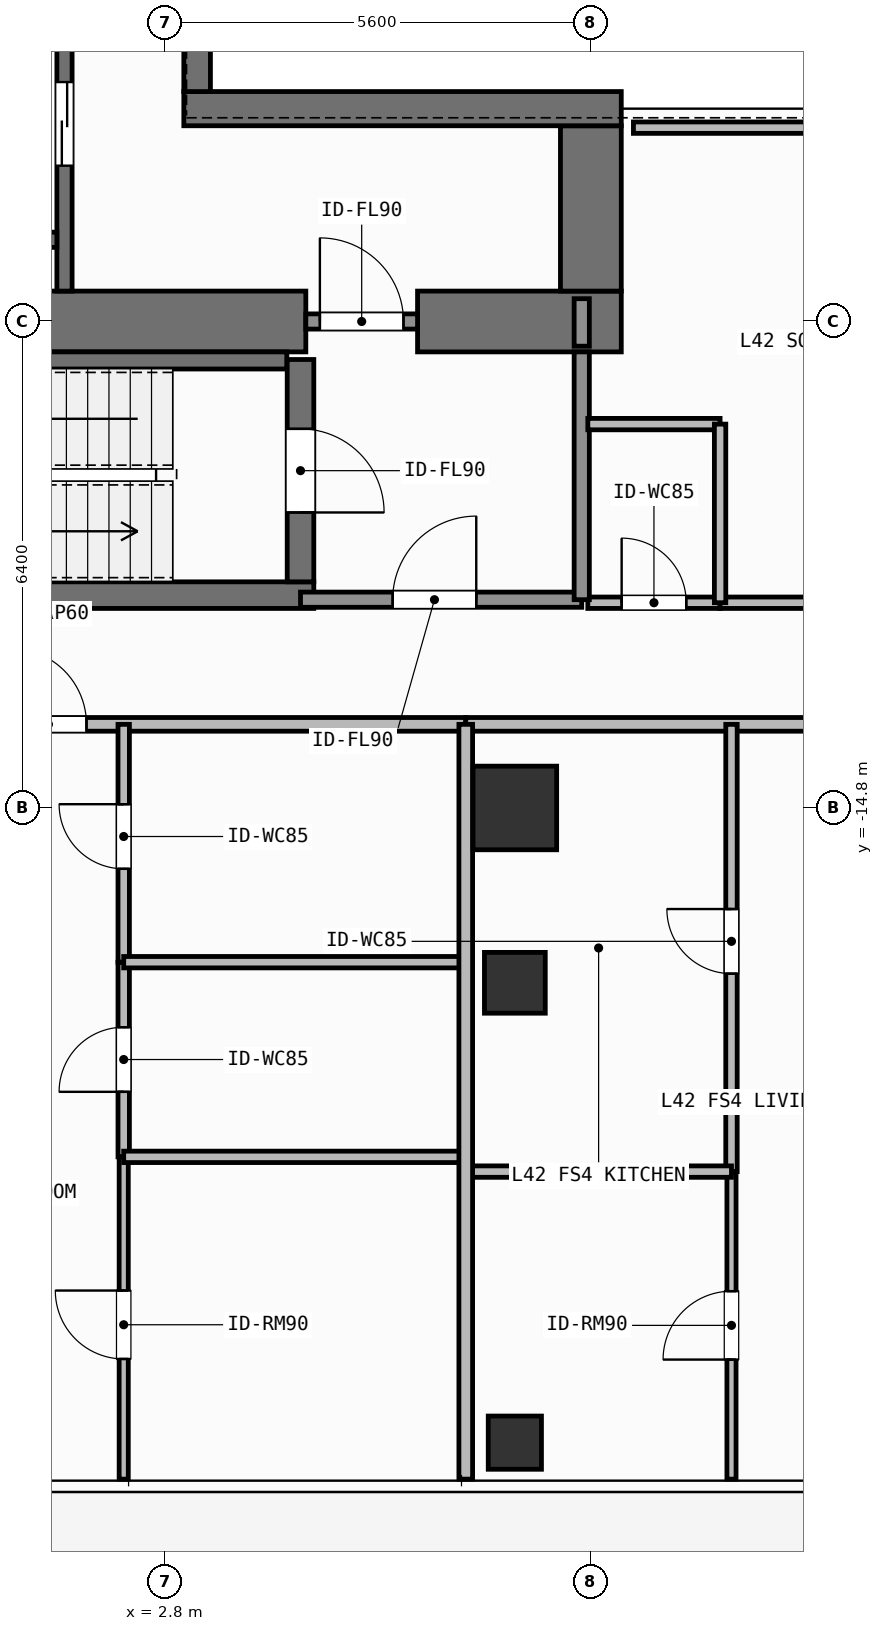
"""IFC4 building model, lengths in metres.
Left out: names, types, materials, properties, quantities, classifications, styles, units other than length and angle.
Written with IfcOpenShell. Run it as: python <this file> out.ifc"""

import sys

from ifc_helpers import new_model, si_unit, direction, frame, frame_2d, origin, origin_2d, place, context, subcontext, project, spatial, rectangle, hollow_rectangle, extrude, element, fill, save


model = new_model("IFC4")
c1 = context("Model", 3, precision=1e-05, world=origin(), true_north=direction((0.0, 1.0)))
c2 = subcontext(c1, "Body", "Model", "MODEL_VIEW")
j1 = project(units=[si_unit("LENGTHUNIT", "METRE"), si_unit("PLANEANGLEUNIT", "RADIAN")], contexts=[c1])
p1 = place(None, origin())
s1 = spatial("IfcSite", under=j1, at=p1, CompositionType="ELEMENT")
p2 = place(p1, origin())
s2 = spatial("IfcBuilding", under=s1, at=p2, CompositionType="ELEMENT")
p3 = place(p2, frame((0.0, 0.0, 171.9)))
s3 = spatial("IfcBuildingStorey", under=s2, at=p3, CompositionType="ELEMENT", Elevation=171.9)
p4 = place(p3, frame((-2.62, -8.4, 0.0), z_axis=(0.0, 0.0, 1.0), x_axis=(1.0, 0.0, 0.0)))
e1 = element("IfcWall", 1, at=p4, inside=s3, PredefinedType="SHEAR", context=c2, shape_type="SweptSolid", body=[
    extrude(rectangle(XDim=7.27, YDim=0.8, at=frame_2d((3.635, 0.0))), origin(), (0.0, 0.0, 1.0), 3.9),
])
p5 = place(p3, frame((6.12, -8.4, 0.0), z_axis=(0.0, 0.0, 1.0), x_axis=(1.0, 0.0, 0.0)))
e2 = element("IfcWall", 2, at=p5, inside=s3, PredefinedType="SHEAR", context=c2, shape_type="SweptSolid", body=[
    extrude(rectangle(XDim=2.68, YDim=0.8, at=frame_2d((1.34, 0.0))), origin(), (0.0, 0.0, 1.0), 3.9),
])
p6 = place(p3, frame((8.4, -8.0, 0.0), z_axis=(0.0, 0.0, 1.0), x_axis=(0.0, 1.0, 0.0)))
e3 = element("IfcWall", 3, at=p6, inside=s3, PredefinedType="SHEAR", context=c2, shape_type="SweptSolid", body=[
    extrude(rectangle(XDim=2.175, YDim=0.8, at=frame_2d((1.087, 0.0))), origin(), (0.0, 0.0, 1.0), 3.9),
])
p7 = place(p3, frame((3.045, -5.6, 0.0), z_axis=(0.0, 0.0, 1.0), x_axis=(1.0, 0.0, 0.0)))
e4 = element("IfcWall", 4, at=p7, inside=s3, PredefinedType="SHEAR", context=c2, shape_type="SweptSolid", body=[
    extrude(rectangle(XDim=5.755, YDim=0.45, at=frame_2d((2.877, 0.0))), origin(), (0.0, 0.0, 1.0), 3.9),
])
p8 = place(p3, frame((3.22, -5.375, 0.0), z_axis=(0.0, 0.0, 1.0), x_axis=(0.0, 1.0, 0.0)))
e5 = element("IfcWall", 5, at=p8, inside=s3, PredefinedType="SHEAR", context=c2, shape_type="SweptSolid", body=[
    extrude(rectangle(XDim=10.75, YDim=0.35, at=frame_2d((5.375, 0.0))), origin(), (0.0, 0.0, 1.0), 3.9),
])
p9 = place(p3, frame((-2.555, -12.0, 0.0), z_axis=(0.0, 0.0, 1.0), x_axis=(1.0, 0.0, 0.0)))
e6 = element("IfcWall", 6, at=p9, inside=s3, PredefinedType="SHEAR", context=c2, shape_type="SweptSolid", body=[
    extrude(rectangle(XDim=7.31, YDim=0.35, at=frame_2d((3.655, 0.0))), origin(), (0.0, 0.0, 1.0), 3.9),
])
p10 = place(p3, frame((-2.2, -8.913, 0.0), z_axis=(0.0, 0.0, 1.0), x_axis=(1.0, 0.0, 0.0)))
e7 = element("IfcWall", 7, at=p10, inside=s3, PredefinedType="SHEAR", context=c2, shape_type="SweptSolid", body=[
    extrude(rectangle(XDim=6.6, YDim=0.225, at=frame_2d((3.3, 0.0))), origin(), (0.0, 0.0, 1.0), 3.9),
])
p11 = place(p3, frame((4.58, -8.9, 0.0), z_axis=(0.0, 0.0, 1.0), x_axis=(0.0, -1.0, 0.0)))
e8 = element("IfcWall", 8, at=p11, inside=s3, PredefinedType="SHEAR", context=c2, shape_type="SweptSolid", body=[
    extrude(rectangle(XDim=2.925, YDim=0.35, at=frame_2d((1.462, 0.0))), origin(), (0.0, 0.0, 1.0), 3.9),
])
p12 = place(p11, frame((0.913, 0.0, 0.0)))
e9 = element("IfcOpeningElement", 9, at=p12, cuts=e8, PredefinedType="OPENING", context=c2, shape_type="SweptSolid", body=[
    extrude(rectangle(XDim=1.1, YDim=2.15, at=frame_2d((0.55, 1.075))), frame((0.0, 0.185, 0.0), z_axis=(0.0, -1.0, 0.0), x_axis=(1.0, 0.0, 0.0)), (0.0, 0.0, 1.0), 0.37),
])
p13 = place(p3, frame((7.4, -14.8, 0.0), z_axis=(0.0, 0.0, 1.0), x_axis=(1.0, 0.0, 0.0)))
e10 = element("IfcColumn", 10, at=p13, inside=s3, PredefinedType="COLUMN", context=c2, shape_type="SweptSolid", body=[
    extrude(rectangle(XDim=1.1, YDim=1.1, at=origin_2d()), origin(), (0.0, 0.0, 1.0), 3.9),
])
p14 = place(p3, frame((7.4, -17.1, 0.0), z_axis=(0.0, 0.0, 1.0), x_axis=(1.0, 0.0, 0.0)))
e11 = element("IfcColumn", 11, at=p14, inside=s3, PredefinedType="COLUMN", context=c2, shape_type="SweptSolid", body=[
    extrude(hollow_rectangle(XDim=0.8, YDim=0.8, WallThickness=0.036, at=origin_2d()), origin(), (0.0, 0.0, 1.0), 3.9),
])
p15 = place(p3, frame((7.4, -23.15, 0.0), z_axis=(0.0, 0.0, 1.0), x_axis=(1.0, 0.0, 0.0)))
e12 = element("IfcColumn", 12, at=p15, inside=s3, PredefinedType="COLUMN", context=c2, shape_type="SweptSolid", body=[
    extrude(hollow_rectangle(XDim=0.7, YDim=0.7, WallThickness=0.032, at=origin_2d()), origin(), (0.0, 0.0, 1.0), 3.9),
])
p16 = place(p3, frame((1.475, -8.0, 0.0), z_axis=(0.0, 0.0, 1.0), x_axis=(0.0, 1.0, 0.0)))
e13 = element("IfcWall", 13, at=p16, inside=s3, PredefinedType="SHEAR", context=c2, shape_type="SweptSolid", body=[
    extrude(rectangle(XDim=3.725, YDim=0.2, at=frame_2d((1.863, 0.0))), origin(), (0.0, 0.0, 1.0), 3.68),
])
p17 = place(p16, frame((1.65, 0.0, 0.0)))
e14 = element("IfcOpeningElement", 14, at=p17, cuts=e13, PredefinedType="OPENING", context=c2, shape_type="SweptSolid", body=[
    extrude(rectangle(XDim=1.1, YDim=2.2, at=frame_2d((0.55, 1.1))), frame((0.0, 0.11, 0.0), z_axis=(0.0, -1.0, 0.0), x_axis=(1.0, 0.0, 0.0)), (0.0, 0.0, 1.0), 0.22),
])
p18 = place(p3, frame((-0.975, -7.325, 0.0), z_axis=(0.0, 0.0, 1.0), x_axis=(1.0, 0.0, 0.0)))
e15 = element("IfcWall", 15, at=p18, inside=s3, PredefinedType="SHEAR", context=c2, shape_type="SweptSolid", body=[
    extrude(rectangle(XDim=2.35, YDim=0.2, at=frame_2d((1.175, 0.0))), origin(), (0.0, 0.0, 1.0), 3.68),
])
p19 = place(p3, frame((4.58, -12.06, 0.0), z_axis=(0.0, 0.0, 1.0), x_axis=(1.0, 0.0, 0.0)))
e16 = element("IfcWall", 16, at=p19, inside=s3, PredefinedType="SOLIDWALL", context=c2, shape_type="SweptSolid", body=[
    extrude(rectangle(XDim=3.7, YDim=0.2, at=frame_2d((1.85, 0.0))), origin(), (0.0, 0.0, 1.0), 3.68),
])
p20 = place(p19, frame((1.212, 0.0, 0.0)))
e17 = element("IfcOpeningElement", 17, at=p20, cuts=e16, PredefinedType="OPENING", context=c2, shape_type="SweptSolid", body=[
    extrude(rectangle(XDim=1.1, YDim=2.15, at=frame_2d((0.55, 1.075))), frame((0.0, 0.11, 0.0), z_axis=(0.0, -1.0, 0.0), x_axis=(1.0, 0.0, 0.0)), (0.0, 0.0, 1.0), 0.22),
])
p21 = place(p3, frame((4.65, -8.4, 0.0), z_axis=(0.0, 0.0, 1.0), x_axis=(1.0, 0.0, 0.0)))
e18 = element("IfcWall", 18, at=p21, inside=s3, PredefinedType="SOLIDWALL", context=c2, shape_type="SweptSolid", body=[
    extrude(rectangle(XDim=1.47, YDim=0.2, at=frame_2d((0.735, 0.0))), origin(), (0.0, 0.0, 1.0), 2.82),
])
p22 = place(p21, frame((0.185, 0.0, 0.0)))
e19 = element("IfcOpeningElement", 19, at=p22, cuts=e18, PredefinedType="OPENING", context=c2, shape_type="SweptSolid", body=[
    extrude(rectangle(XDim=1.1, YDim=2.15, at=frame_2d((0.55, 1.075))), frame((0.0, 0.11, 0.0), z_axis=(0.0, -1.0, 0.0), x_axis=(1.0, 0.0, 0.0)), (0.0, 0.0, 1.0), 0.22),
])
p23 = place(p3, frame((8.36, -12.1, 0.0), z_axis=(0.0, 0.0, 1.0), x_axis=(1.0, 0.0, 0.0)))
e20 = element("IfcWall", 20, at=p23, inside=s3, PredefinedType="PARTITIONING", context=c2, shape_type="SweptSolid", body=[
    extrude(rectangle(XDim=1.74, YDim=0.15, at=frame_2d((0.87, 0.0))), origin(), (0.0, 0.0, 1.0), 3.68),
])
p24 = place(p23, frame((0.445, 0.0, 0.0)))
e21 = element("IfcOpeningElement", 21, at=p24, cuts=e20, PredefinedType="OPENING", context=c2, shape_type="SweptSolid", body=[
    extrude(rectangle(XDim=0.85, YDim=2.1, at=frame_2d((0.425, 1.05))), frame((0.0, 0.085, 0.0), z_axis=(0.0, -1.0, 0.0), x_axis=(1.0, 0.0, 0.0)), (0.0, 0.0, 1.0), 0.17),
])
p25 = place(p3, frame((10.1, -12.1, 0.0), z_axis=(0.0, 0.0, 1.0), x_axis=(1.0, 0.0, 0.0)))
e22 = element("IfcWall", 22, at=p25, inside=s3, PredefinedType="PARTITIONING", context=c2, shape_type="SweptSolid", body=[
    extrude(rectangle(XDim=5.48, YDim=0.15, at=frame_2d((2.74, 0.0))), origin(), (0.0, 0.0, 1.0), 3.68),
])
p26 = place(p25, frame((2.29, 0.0, 0.0)))
e23 = element("IfcOpeningElement", 23, at=p26, cuts=e22, PredefinedType="OPENING", context=c2, shape_type="SweptSolid", body=[
    extrude(rectangle(XDim=0.9, YDim=2.1, at=frame_2d((0.45, 1.05))), frame((0.0, 0.085, 0.0), z_axis=(0.0, -1.0, 0.0), x_axis=(1.0, 0.0, 0.0)), (0.0, 0.0, 1.0), 0.17),
])
p27 = place(p3, frame((-1.9, -13.7, 0.0), z_axis=(0.0, 0.0, 1.0), x_axis=(1.0, 0.0, 0.0)))
e24 = element("IfcWall", 24, at=p27, inside=s3, PredefinedType="PARTITIONING", context=c2, shape_type="SweptSolid", body=[
    extrude(rectangle(XDim=8.654, YDim=0.18, at=frame_2d((4.327, 0.0))), origin(), (0.0, 0.0, 1.0), 3.68),
])
p28 = place(p27, frame((2.664, 0.0, 0.0)))
e25 = element("IfcOpeningElement", 25, at=p28, cuts=e24, PredefinedType="OPENING", context=c2, shape_type="SweptSolid", body=[
    extrude(rectangle(XDim=1.0, YDim=2.2, at=frame_2d((0.5, 1.1))), frame((0.0, 0.1, 0.0), z_axis=(0.0, -1.0, 0.0), x_axis=(1.0, 0.0, 0.0)), (0.0, 0.0, 1.0), 0.2),
])
p29 = place(p3, frame((2.254, -16.829, 0.0), z_axis=(0.0, 0.0, 1.0), x_axis=(0.0, 1.0, 0.0)))
e26 = element("IfcWall", 26, at=p29, inside=s3, PredefinedType="PARTITIONING", context=c2, shape_type="SweptSolid", body=[
    extrude(rectangle(XDim=3.129, YDim=0.15, at=frame_2d((1.564, 0.0))), origin(), (0.0, 0.0, 1.0), 3.68),
])
p30 = place(p29, frame((1.229, 0.0, 0.0)))
e27 = element("IfcOpeningElement", 27, at=p30, cuts=e26, PredefinedType="OPENING", context=c2, shape_type="SweptSolid", body=[
    extrude(rectangle(XDim=0.85, YDim=2.1, at=frame_2d((0.425, 1.05))), frame((0.0, 0.085, 0.0), z_axis=(0.0, -1.0, 0.0), x_axis=(1.0, 0.0, 0.0)), (0.0, 0.0, 1.0), 0.17),
])
p31 = place(p3, frame((2.254, -19.39, 0.0), z_axis=(0.0, 0.0, 1.0), x_axis=(0.0, 1.0, 0.0)))
e28 = element("IfcWall", 28, at=p31, inside=s3, PredefinedType="PARTITIONING", context=c2, shape_type="SweptSolid", body=[
    extrude(rectangle(XDim=2.561, YDim=0.15, at=frame_2d((1.28, 0.0))), origin(), (0.0, 0.0, 1.0), 3.68),
])
p32 = place(p31, frame((0.855, 0.0, 0.0)))
e29 = element("IfcOpeningElement", 29, at=p32, cuts=e28, PredefinedType="OPENING", context=c2, shape_type="SweptSolid", body=[
    extrude(rectangle(XDim=0.85, YDim=2.1, at=frame_2d((0.425, 1.05))), frame((0.0, 0.085, 0.0), z_axis=(0.0, -1.0, 0.0), x_axis=(1.0, 0.0, 0.0)), (0.0, 0.0, 1.0), 0.17),
])
p33 = place(p3, frame((2.254, -23.63, 0.0), z_axis=(0.0, 0.0, 1.0), x_axis=(0.0, 1.0, 0.0)))
e30 = element("IfcWall", 30, at=p33, inside=s3, PredefinedType="PARTITIONING", context=c2, shape_type="SweptSolid", body=[
    extrude(rectangle(XDim=4.24, YDim=0.12, at=frame_2d((2.12, 0.0))), origin(), (0.0, 0.0, 1.0), 3.68),
])
p34 = place(p33, frame((1.581, 0.0, 0.0)))
e31 = element("IfcOpeningElement", 31, at=p34, cuts=e30, PredefinedType="OPENING", context=c2, shape_type="SweptSolid", body=[
    extrude(rectangle(XDim=0.9, YDim=2.1, at=frame_2d((0.45, 1.05))), frame((0.0, 0.07, 0.0), z_axis=(0.0, -1.0, 0.0), x_axis=(1.0, 0.0, 0.0)), (0.0, 0.0, 1.0), 0.14),
])
p35 = place(p3, frame((6.754, -13.7, 0.0), z_axis=(0.0, 0.0, 1.0), x_axis=(1.0, 0.0, 0.0)))
e32 = element("IfcWall", 32, at=p35, inside=s3, PredefinedType="PARTITIONING", context=c2, shape_type="SweptSolid", body=[
    extrude(rectangle(XDim=11.566, YDim=0.18, at=frame_2d((5.783, 0.0))), origin(), (0.0, 0.0, 1.0), 3.68),
])
p36 = place(p35, frame((4.833, 0.0, 0.0)))
e33 = element("IfcOpeningElement", 33, at=p36, cuts=e32, PredefinedType="OPENING", context=c2, shape_type="SweptSolid", body=[
    extrude(rectangle(XDim=1.0, YDim=2.2, at=frame_2d((0.5, 1.1))), frame((0.0, 0.1, 0.0), z_axis=(0.0, -1.0, 0.0), x_axis=(1.0, 0.0, 0.0)), (0.0, 0.0, 1.0), 0.2),
])
p37 = place(p3, frame((10.25, -19.584, 0.0), z_axis=(0.0, 0.0, 1.0), x_axis=(0.0, 1.0, 0.0)))
e34 = element("IfcWall", 34, at=p37, inside=s3, PredefinedType="PARTITIONING", context=c2, shape_type="SweptSolid", body=[
    extrude(rectangle(XDim=5.884, YDim=0.15, at=frame_2d((2.942, 0.0))), origin(), (0.0, 0.0, 1.0), 3.68),
])
p38 = place(p37, frame((2.604, 0.0, 0.0)))
e35 = element("IfcOpeningElement", 35, at=p38, cuts=e34, PredefinedType="OPENING", context=c2, shape_type="SweptSolid", body=[
    extrude(rectangle(XDim=0.85, YDim=2.1, at=frame_2d((0.425, 1.05))), frame((0.0, 0.085, 0.0), z_axis=(0.0, -1.0, 0.0), x_axis=(1.0, 0.0, 0.0)), (0.0, 0.0, 1.0), 0.17),
])
p39 = place(p3, frame((10.25, -23.63, 0.0), z_axis=(0.0, 0.0, 1.0), x_axis=(0.0, 1.0, 0.0)))
e36 = element("IfcWall", 36, at=p39, inside=s3, PredefinedType="PARTITIONING", context=c2, shape_type="SweptSolid", body=[
    extrude(rectangle(XDim=4.046, YDim=0.12, at=frame_2d((2.023, 0.0))), origin(), (0.0, 0.0, 1.0), 3.68),
])
p40 = place(p39, frame((1.573, 0.0, 0.0)))
e37 = element("IfcOpeningElement", 37, at=p40, cuts=e36, PredefinedType="OPENING", context=c2, shape_type="SweptSolid", body=[
    extrude(rectangle(XDim=0.9, YDim=2.1, at=frame_2d((0.45, 1.05))), frame((0.0, 0.07, 0.0), z_axis=(0.0, -1.0, 0.0), x_axis=(1.0, 0.0, 0.0)), (0.0, 0.0, 1.0), 0.14),
])
p41 = place(p3, frame((8.28, -12.06, 0.0), z_axis=(0.0, 0.0, 1.0), x_axis=(0.0, 1.0, 0.0)))
e38 = element("IfcWall", 38, at=p41, inside=s3, PredefinedType="SOLIDWALL", context=c2, shape_type="SweptSolid", body=[
    extrude(rectangle(XDim=3.26, YDim=0.2, at=frame_2d((1.63, 0.0))), origin(), (0.0, 0.0, 1.0), 3.68),
])
p42 = place(p3, frame((8.28, -8.725, 0.0), z_axis=(0.0, 0.0, 1.0), x_axis=(0.0, 1.0, 0.0)))
e39 = element("IfcWall", 39, at=p42, inside=s3, PredefinedType="SOLIDWALL", context=c2, shape_type="SweptSolid", body=[
    extrude(rectangle(XDim=0.625, YDim=0.2, at=frame_2d((0.312, 0.0))), origin(), (0.0, 0.0, 1.0), 3.68),
])
p43 = place(p3, frame((8.36, -9.75, 0.0), z_axis=(0.0, 0.0, 1.0), x_axis=(1.0, 0.0, 0.0)))
e40 = element("IfcWall", 40, at=p43, inside=s3, PredefinedType="PARTITIONING", context=c2, shape_type="SweptSolid", body=[
    extrude(rectangle(XDim=1.74, YDim=0.15, at=frame_2d((0.87, 0.0))), origin(), (0.0, 0.0, 1.0), 3.68),
])
p44 = place(p3, frame((10.1, -12.1, 0.0), z_axis=(0.0, 0.0, 1.0), x_axis=(0.0, 1.0, 0.0)))
e41 = element("IfcWall", 41, at=p44, inside=s3, PredefinedType="PARTITIONING", context=c2, shape_type="SweptSolid", body=[
    extrude(rectangle(XDim=2.35, YDim=0.15, at=frame_2d((1.175, 0.0))), origin(), (0.0, 0.0, 1.0), 3.68),
])
p45 = place(p3, frame((8.96, -5.85, 0.0), z_axis=(0.0, 0.0, 1.0), x_axis=(1.0, 0.0, 0.0)))
e42 = element("IfcWall", 42, at=p45, inside=s3, PredefinedType="PARTITIONING", context=c2, shape_type="SweptSolid", body=[
    extrude(rectangle(XDim=6.62, YDim=0.15, at=frame_2d((3.31, 0.0))), origin(), (0.0, 0.0, 1.0), 3.68),
])
p46 = place(p3, frame((2.254, -16.829, 0.0), z_axis=(0.0, 0.0, 1.0), x_axis=(1.0, 0.0, 0.0)))
e43 = element("IfcWall", 43, at=p46, inside=s3, PredefinedType="PARTITIONING", context=c2, shape_type="SweptSolid", body=[
    extrude(rectangle(XDim=4.5, YDim=0.15, at=frame_2d((2.25, 0.0))), origin(), (0.0, 0.0, 1.0), 3.082),
])
p47 = place(p3, frame((2.254, -19.39, 0.0), z_axis=(0.0, 0.0, 1.0), x_axis=(1.0, 0.0, 0.0)))
e44 = element("IfcWall", 44, at=p47, inside=s3, PredefinedType="PARTITIONING", context=c2, shape_type="SweptSolid", body=[
    extrude(rectangle(XDim=4.5, YDim=0.15, at=frame_2d((2.25, 0.0))), origin(), (0.0, 0.0, 1.0), 3.68),
])
p48 = place(p3, frame((6.754, -19.584, 0.0), z_axis=(0.0, 0.0, 1.0), x_axis=(1.0, 0.0, 0.0)))
e45 = element("IfcWall", 45, at=p48, inside=s3, PredefinedType="PARTITIONING", context=c2, shape_type="SweptSolid", body=[
    extrude(rectangle(XDim=3.496, YDim=0.15, at=frame_2d((1.748, 0.0))), origin(), (0.0, 0.0, 1.0), 3.68),
])
p49 = place(p3, frame((6.754, -23.63, 0.0), z_axis=(0.0, 0.0, 1.0), x_axis=(0.0, 1.0, 0.0)))
e46 = element("IfcWall", 46, at=p49, inside=s3, PredefinedType="PARTITIONING", context=c2, shape_type="SweptSolid", body=[
    extrude(rectangle(XDim=9.93, YDim=0.18, at=frame_2d((4.965, 0.0))), origin(), (0.0, 0.0, 1.0), 3.68),
])
p50 = place(p17, origin())
e47 = element("IfcDoor", 47, at=p50, inside=s3, OperationType="SLIDING_TO_LEFT", PredefinedType="DOOR", context=c2, shape_type="SweptSolid", body=[
    extrude(rectangle(XDim=1.1, YDim=2.2, at=frame_2d((0.55, 1.1))), frame((0.0, 0.025, 0.0), z_axis=(0.0, -1.0, 0.0), x_axis=(1.0, 0.0, 0.0)), (0.0, 0.0, 1.0), 0.05),
])
fill(e14, e47)
p51 = place(p12, origin())
e48 = element("IfcDoor", 48, at=p51, inside=s3, OperationType="SINGLE_SWING_RIGHT", PredefinedType="DOOR", context=c2, shape_type="SweptSolid", body=[
    extrude(rectangle(XDim=1.1, YDim=2.15, at=frame_2d((0.55, 1.075))), frame((0.0, 0.025, 0.0), z_axis=(0.0, -1.0, 0.0), x_axis=(1.0, 0.0, 0.0)), (0.0, 0.0, 1.0), 0.05),
])
fill(e9, e48)
p52 = place(p20, origin())
e49 = element("IfcDoor", 49, at=p52, inside=s3, OperationType="SINGLE_SWING_RIGHT", PredefinedType="DOOR", context=c2, shape_type="SweptSolid", body=[
    extrude(rectangle(XDim=1.1, YDim=2.15, at=frame_2d((0.55, 1.075))), frame((0.0, 0.025, 0.0), z_axis=(0.0, -1.0, 0.0), x_axis=(1.0, 0.0, 0.0)), (0.0, 0.0, 1.0), 0.05),
])
fill(e17, e49)
p53 = place(p22, origin())
e50 = element("IfcDoor", 50, at=p53, inside=s3, OperationType="SINGLE_SWING_LEFT", PredefinedType="DOOR", context=c2, shape_type="SweptSolid", body=[
    extrude(rectangle(XDim=1.1, YDim=2.15, at=frame_2d((0.55, 1.075))), frame((0.0, 0.025, 0.0), z_axis=(0.0, -1.0, 0.0), x_axis=(1.0, 0.0, 0.0)), (0.0, 0.0, 1.0), 0.05),
])
fill(e19, e50)
p54 = place(p24, origin())
e51 = element("IfcDoor", 51, at=p54, inside=s3, OperationType="SINGLE_SWING_LEFT", PredefinedType="DOOR", context=c2, shape_type="SweptSolid", body=[
    extrude(rectangle(XDim=0.85, YDim=2.1, at=frame_2d((0.425, 1.05))), frame((0.0, 0.025, 0.0), z_axis=(0.0, -1.0, 0.0), x_axis=(1.0, 0.0, 0.0)), (0.0, 0.0, 1.0), 0.05),
])
fill(e21, e51)
p55 = place(p28, origin())
e52 = element("IfcDoor", 52, at=p55, inside=s3, OperationType="SINGLE_SWING_LEFT", PredefinedType="DOOR", context=c2, shape_type="SweptSolid", body=[
    extrude(rectangle(XDim=1.0, YDim=2.2, at=frame_2d((0.5, 1.1))), frame((0.0, 0.025, 0.0), z_axis=(0.0, -1.0, 0.0), x_axis=(1.0, 0.0, 0.0)), (0.0, 0.0, 1.0), 0.05),
])
fill(e25, e52)
p56 = place(p30, origin())
e53 = element("IfcDoor", 53, at=p56, inside=s3, OperationType="SINGLE_SWING_RIGHT", PredefinedType="DOOR", context=c2, shape_type="SweptSolid", body=[
    extrude(rectangle(XDim=0.85, YDim=2.1, at=frame_2d((0.425, 1.05))), frame((0.0, 0.025, 0.0), z_axis=(0.0, -1.0, 0.0), x_axis=(1.0, 0.0, 0.0)), (0.0, 0.0, 1.0), 0.05),
])
fill(e27, e53)
p57 = place(p32, origin())
e54 = element("IfcDoor", 54, at=p57, inside=s3, OperationType="SINGLE_SWING_LEFT", PredefinedType="DOOR", context=c2, shape_type="SweptSolid", body=[
    extrude(rectangle(XDim=0.85, YDim=2.1, at=frame_2d((0.425, 1.05))), frame((0.0, 0.025, 0.0), z_axis=(0.0, -1.0, 0.0), x_axis=(1.0, 0.0, 0.0)), (0.0, 0.0, 1.0), 0.05),
])
fill(e29, e54)
p58 = place(p34, origin())
e55 = element("IfcDoor", 55, at=p58, inside=s3, OperationType="SINGLE_SWING_RIGHT", PredefinedType="DOOR", context=c2, shape_type="SweptSolid", body=[
    extrude(rectangle(XDim=0.9, YDim=2.1, at=frame_2d((0.45, 1.05))), frame((0.0, 0.025, 0.0), z_axis=(0.0, -1.0, 0.0), x_axis=(1.0, 0.0, 0.0)), (0.0, 0.0, 1.0), 0.05),
])
fill(e31, e55)
p59 = place(p38, origin())
e56 = element("IfcDoor", 56, at=p59, inside=s3, OperationType="SINGLE_SWING_RIGHT", PredefinedType="DOOR", context=c2, shape_type="SweptSolid", body=[
    extrude(rectangle(XDim=0.85, YDim=2.1, at=frame_2d((0.425, 1.05))), frame((0.0, 0.025, 0.0), z_axis=(0.0, -1.0, 0.0), x_axis=(1.0, 0.0, 0.0)), (0.0, 0.0, 1.0), 0.05),
])
fill(e35, e56)
p60 = place(p40, origin())
e57 = element("IfcDoor", 57, at=p60, inside=s3, OperationType="SINGLE_SWING_LEFT", PredefinedType="DOOR", context=c2, shape_type="SweptSolid", body=[
    extrude(rectangle(XDim=0.9, YDim=2.1, at=frame_2d((0.45, 1.05))), frame((0.0, 0.025, 0.0), z_axis=(0.0, -1.0, 0.0), x_axis=(1.0, 0.0, 0.0)), (0.0, 0.0, 1.0), 0.05),
])
fill(e37, e57)
save(model, sys.argv[1])
